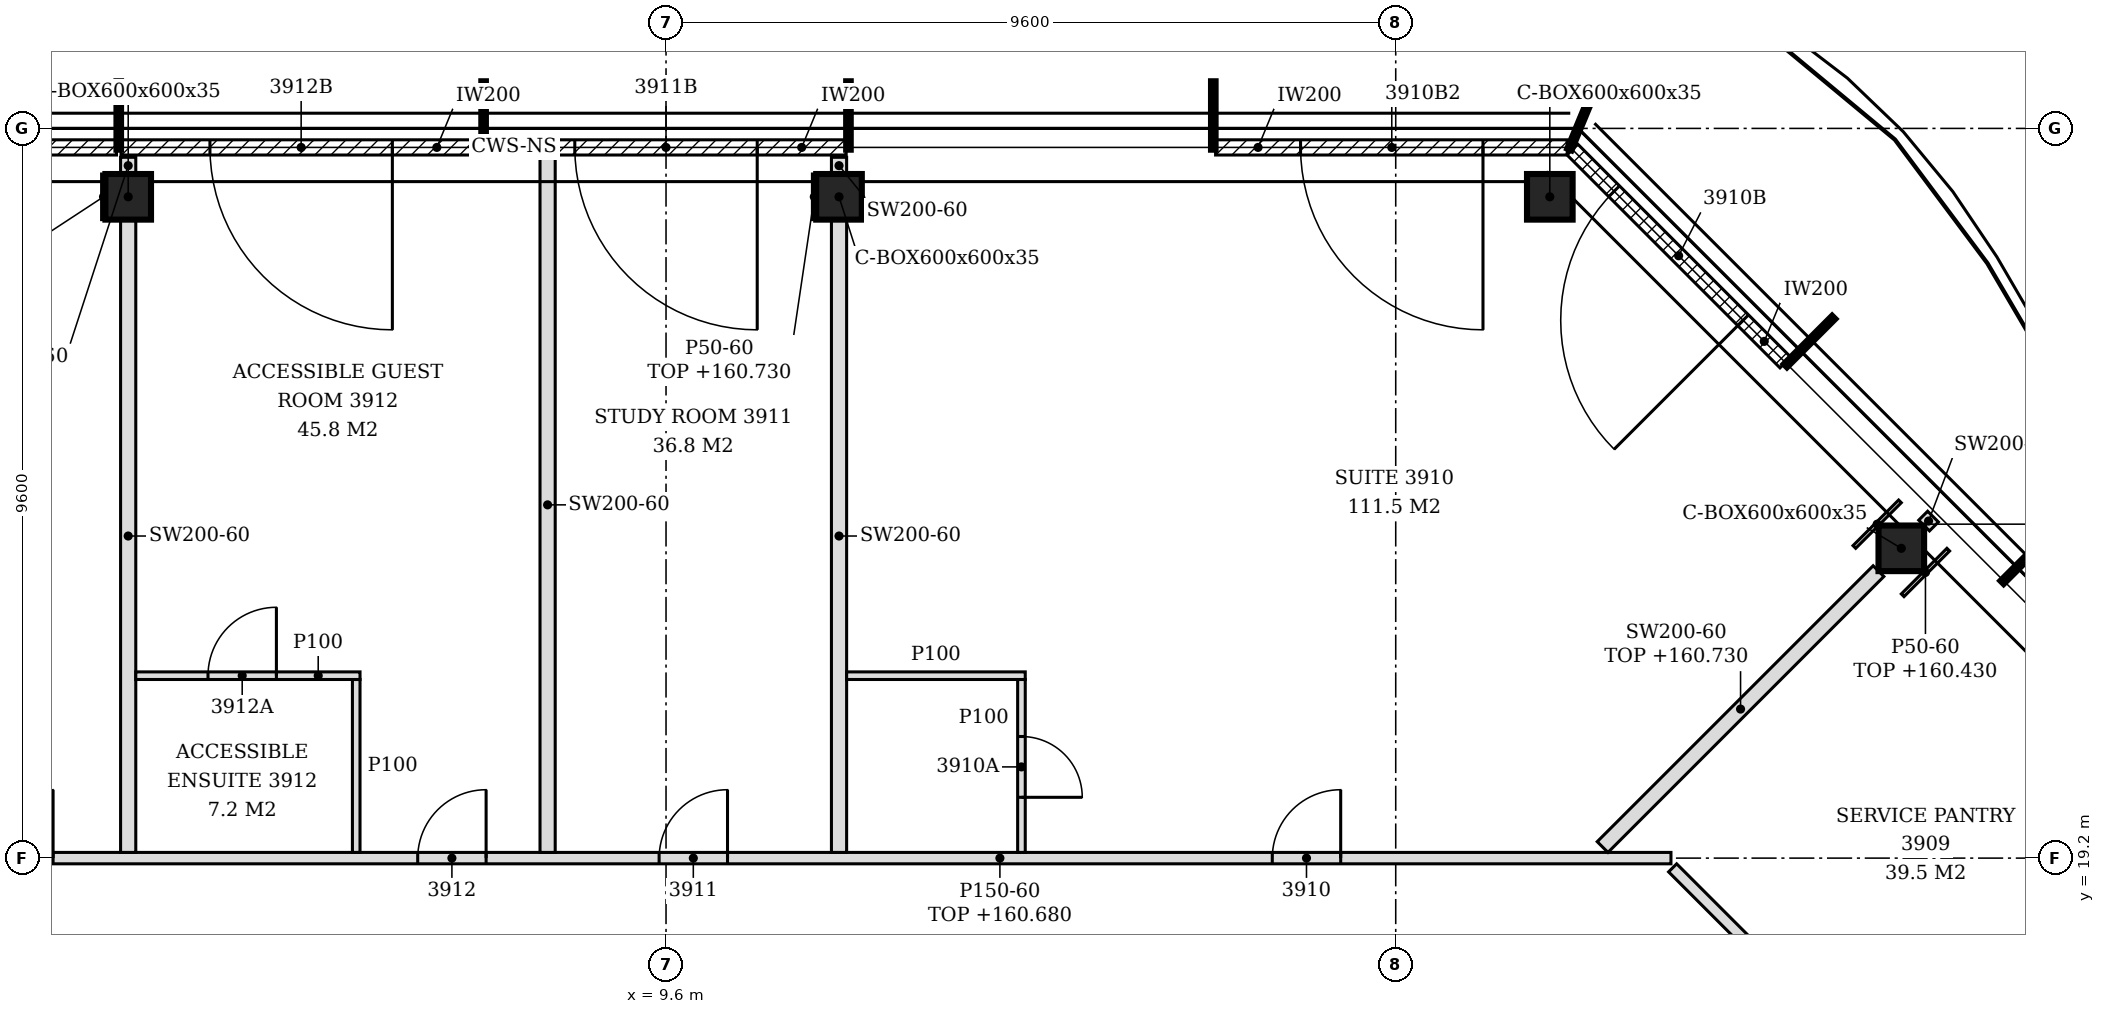
"""IFC4 building model, lengths in metres.
Left out: names, types, materials, properties, quantities, classifications, styles, units other than length and angle.
Written with IfcOpenShell. Run it as: python <this file> out.ifc"""

import sys

from ifc_helpers import new_model, si_unit, direction, frame, frame_2d, origin, origin_2d, place, context, subcontext, project, spatial, polyline, rectangle, hollow_rectangle, outline, extrude, element, fill, save


model = new_model("IFC4")
c1 = context("Model", 3, precision=1e-05, world=origin(), true_north=direction((0.0, 1.0)))
c2 = subcontext(c1, "Body", "Model", "MODEL_VIEW")
j1 = project(units=[si_unit("LENGTHUNIT", "METRE"), si_unit("PLANEANGLEUNIT", "RADIAN")], contexts=[c1])
p1 = place(None, origin())
s1 = spatial("IfcSite", under=j1, at=p1, CompositionType="ELEMENT")
p2 = place(p1, origin())
s2 = spatial("IfcBuilding", under=s1, at=p2, CompositionType="ELEMENT")
p3 = place(p2, frame((0.0, 0.0, 157.8)))
s3 = spatial("IfcBuildingStorey", under=s2, at=p3, CompositionType="ELEMENT", Elevation=157.8)
for number, where, z_axis, x_axis in (
    (1, (25.852, 23.276, -0.15), (0.0, 0.0, 1.0), (1.0, 0.0, 0.0)),
    (2, (21.227, 27.9, -0.15), (0.0, 0.0, 1.0), (1.0, 0.0, 0.0)),
    (3, (11.876, 27.9, -0.15), (0.0, 0.0, 1.0), (1.0, 0.0, 0.0)),
    (4, (2.524, 27.9, -0.15), (0.0, 0.0, 1.0), (1.0, 0.0, 0.0)),
):
    element("IfcColumn", number, at=place(p3, frame(where, z_axis=z_axis, x_axis=x_axis)), inside=s3, PredefinedType="COLUMN", context=c2, shape_type="SweptSolid", body=[
        extrude(hollow_rectangle(XDim=0.6, YDim=0.6, WallThickness=0.035, at=origin_2d()), origin(), (0.0, 0.0, 1.0), 3.6),
    ])
p4 = place(p3, frame((24.326, 25.72, 0.0), z_axis=(0.0, 0.0, 1.0), x_axis=(-0.707106781187, 0.707106781187, 0.0)))
e5 = element("IfcWall", 5, at=p4, inside=s3, PredefinedType="NOTDEFINED", context=c2, shape_type="SweptSolid", body=[
    extrude(rectangle(XDim=3.962, YDim=0.2, at=frame_2d((1.981, 0.0))), origin(), (0.0, 0.0, 1.0), 3.45),
])
p5 = place(p4, frame((0.786, 0.0, 0.0)))
e6 = element("IfcOpeningElement", 6, at=p5, cuts=e5, PredefinedType="OPENING", context=c2, shape_type="SweptSolid", body=[
    extrude(rectangle(XDim=2.4, YDim=2.4, at=frame_2d((1.2, 1.2))), frame((0.0, 0.11, 0.0), z_axis=(0.0, -1.0, 0.0), x_axis=(1.0, 0.0, 0.0)), (0.0, 0.0, 1.0), 0.22),
])
p6 = place(p3, frame((21.457, 28.55, 0.0), z_axis=(0.0, 0.0, 1.0), x_axis=(-1.0, 0.0, 0.0)))
e7 = element("IfcWall", 7, at=p6, inside=s3, PredefinedType="NOTDEFINED", context=c2, shape_type="SweptSolid", body=[
    extrude(rectangle(XDim=4.626, YDim=0.2, at=frame_2d((2.313, 0.0))), origin(), (0.0, 0.0, 1.0), 3.45),
])
p7 = place(p6, frame((1.108, 0.0, 0.0)))
e8 = element("IfcOpeningElement", 8, at=p7, cuts=e7, PredefinedType="OPENING", context=c2, shape_type="SweptSolid", body=[
    extrude(rectangle(XDim=2.4, YDim=2.4, at=frame_2d((1.2, 1.2))), frame((0.0, 0.11, 0.0), z_axis=(0.0, -1.0, 0.0), x_axis=(1.0, 0.0, 0.0)), (0.0, 0.0, 1.0), 0.22),
])
p8 = place(p3, frame((11.97, 28.55, 0.0), z_axis=(0.0, 0.0, 1.0), x_axis=(-1.0, 0.0, 0.0)))
e9 = element("IfcWall", 9, at=p8, inside=s3, PredefinedType="NOTDEFINED", context=c2, shape_type="SweptSolid", body=[
    extrude(rectangle(XDim=4.74, YDim=0.2, at=frame_2d((2.37, 0.0))), origin(), (0.0, 0.0, 1.0), 3.45),
])
p9 = place(p8, frame((1.17, 0.0, 0.0)))
e10 = element("IfcOpeningElement", 10, at=p9, cuts=e9, PredefinedType="OPENING", context=c2, shape_type="SweptSolid", body=[
    extrude(rectangle(XDim=2.4, YDim=2.4, at=frame_2d((1.2, 1.2))), frame((0.0, 0.11, 0.0), z_axis=(0.0, -1.0, 0.0), x_axis=(1.0, 0.0, 0.0)), (0.0, 0.0, 1.0), 0.22),
])
p10 = place(p3, frame((7.17, 28.55, 0.0), z_axis=(0.0, 0.0, 1.0), x_axis=(-1.0, 0.0, 0.0)))
e11 = element("IfcWall", 11, at=p10, inside=s3, PredefinedType="NOTDEFINED", context=c2, shape_type="SweptSolid", body=[
    extrude(rectangle(XDim=4.74, YDim=0.2, at=frame_2d((2.37, 0.0))), origin(), (0.0, 0.0, 1.0), 3.45),
])
p11 = place(p10, frame((1.17, 0.0, 0.0)))
e12 = element("IfcOpeningElement", 12, at=p11, cuts=e11, PredefinedType="OPENING", context=c2, shape_type="SweptSolid", body=[
    extrude(rectangle(XDim=2.4, YDim=2.4, at=frame_2d((1.2, 1.2))), frame((0.0, 0.11, 0.0), z_axis=(0.0, -1.0, 0.0), x_axis=(1.0, 0.0, 0.0)), (0.0, 0.0, 1.0), 0.22),
])
p12 = place(p3, frame((2.37, 28.55, 0.0), z_axis=(0.0, 0.0, 1.0), x_axis=(-1.0, 0.0, 0.0)))
e13 = element("IfcWall", 13, at=p12, inside=s3, PredefinedType="NOTDEFINED", context=c2, shape_type="SweptSolid", body=[
    extrude(rectangle(XDim=4.74, YDim=0.2, at=frame_2d((2.37, 0.0))), origin(), (0.0, 0.0, 1.0), 3.45),
])
p13 = place(p12, frame((1.17, 0.0, 0.0)))
e14 = element("IfcOpeningElement", 14, at=p13, cuts=e13, PredefinedType="OPENING", context=c2, shape_type="SweptSolid", body=[
    extrude(rectangle(XDim=2.4, YDim=2.4, at=frame_2d((1.2, 1.2))), frame((0.0, 0.11, 0.0), z_axis=(0.0, -1.0, 0.0), x_axis=(1.0, 0.0, 0.0)), (0.0, 0.0, 1.0), 0.22),
])
p14 = place(p3, frame((26.869, 15.045, 0.0), z_axis=(0.0, 0.0, 1.0), x_axis=(-0.706999586952, 0.707213959174, 0.0)))
e15 = element("IfcWall", 15, at=p14, inside=s3, PredefinedType="PARTITIONING", context=c2, shape_type="SweptSolid", body=[
    extrude(rectangle(XDim=5.694, YDim=0.15, at=frame_2d((2.847, 0.0))), origin(), (0.0, 0.0, 1.0), 2.93),
])
p15 = place(p14, frame((2.487, 0.0, 0.0)))
e16 = element("IfcOpeningElement", 16, at=p15, cuts=e15, PredefinedType="OPENING", context=c2, shape_type="SweptSolid", body=[
    extrude(rectangle(XDim=0.9, YDim=2.1, at=frame_2d((0.45, 1.05))), frame((0.0, 0.085, 0.0), z_axis=(0.0, -1.0, 0.0), x_axis=(1.0, 0.0, 0.0)), (0.0, 0.0, 1.0), 0.17),
])
p16 = place(p3, frame((-8.421, 19.2, 0.0), z_axis=(0.0, 0.0, 1.0), x_axis=(1.0, 0.0, 0.0)))
e17 = element("IfcWall", 17, at=p16, inside=s3, PredefinedType="PARTITIONING", context=c2, shape_type="SweptSolid", body=[
    extrude(outline(polyline([(0.0, 0.0), (31.242, 0.0), (31.242, 2.88), (27.771, 2.88), (27.769, 2.73), (27.471, 2.73), (27.469, 2.88), (15.771, 2.88), (15.769, 2.73), (15.471, 2.73), (15.469, 2.88), (3.771, 2.88), (3.769, 2.73), (3.471, 2.73), (3.469, 2.88), (0.0, 2.88), (0.0, 0.0)])), frame((0.0, 0.075, 0.0), z_axis=(0.0, -1.0, 0.0), x_axis=(1.0, 0.0, 0.0)), (0.0, 0.0, 1.0), 0.15),
])
p17 = place(p16, frame((25.997, 0.0, 0.0)))
e18 = element("IfcOpeningElement", 18, at=p17, cuts=e17, PredefinedType="OPENING", context=c2, shape_type="SweptSolid", body=[
    extrude(rectangle(XDim=0.9, YDim=2.1, at=frame_2d((0.45, 1.05))), frame((0.0, 0.085, 0.0), z_axis=(0.0, -1.0, 0.0), x_axis=(1.0, 0.0, 0.0)), (0.0, 0.0, 1.0), 0.17),
])
p18 = place(p16, frame((17.93, 0.0, 0.0)))
e19 = element("IfcOpeningElement", 19, at=p18, cuts=e17, PredefinedType="OPENING", context=c2, shape_type="SweptSolid", body=[
    extrude(rectangle(XDim=0.9, YDim=2.1, at=frame_2d((0.45, 1.05))), frame((0.0, 0.085, 0.0), z_axis=(0.0, -1.0, 0.0), x_axis=(1.0, 0.0, 0.0)), (0.0, 0.0, 1.0), 0.17),
])
p19 = place(p16, frame((14.754, 0.0, 0.0)))
e20 = element("IfcOpeningElement", 20, at=p19, cuts=e17, PredefinedType="OPENING", context=c2, shape_type="SweptSolid", body=[
    extrude(rectangle(XDim=0.9, YDim=2.1, at=frame_2d((0.45, 1.05))), frame((0.0, 0.085, 0.0), z_axis=(0.0, -1.0, 0.0), x_axis=(1.0, 0.0, 0.0)), (0.0, 0.0, 1.0), 0.17),
])
p20 = place(p16, frame((9.057, 0.0, 0.0)))
e21 = element("IfcOpeningElement", 21, at=p20, cuts=e17, PredefinedType="OPENING", context=c2, shape_type="SweptSolid", body=[
    extrude(rectangle(XDim=0.9, YDim=2.1, at=frame_2d((0.45, 1.05))), frame((0.0, 0.085, 0.0), z_axis=(0.0, -1.0, 0.0), x_axis=(1.0, 0.0, 0.0)), (0.0, 0.0, 1.0), 0.17),
])
p21 = place(p16, frame((2.907, 0.0, 0.0)))
e22 = element("IfcOpeningElement", 22, at=p21, cuts=e17, PredefinedType="OPENING", context=c2, shape_type="SweptSolid", body=[
    extrude(rectangle(XDim=0.9, YDim=2.1, at=frame_2d((0.45, 1.05))), frame((0.0, 0.085, 0.0), z_axis=(0.0, -1.0, 0.0), x_axis=(1.0, 0.0, 0.0)), (0.0, 0.0, 1.0), 0.17),
])
p22 = place(p3, frame((2.524, 19.275, 0.0), z_axis=(0.0, 0.0, 1.0), x_axis=(0.0, 1.0, 0.0)))
e23 = element("IfcWall", 23, at=p22, inside=s3, PredefinedType="PARTITIONING", context=c2, shape_type="SweptSolid", body=[
    extrude(outline(polyline([(0.0, 0.0), (8.325, 0.0), (8.325, 3.45), (4.83, 3.45), (4.828, 2.88), (4.62, 2.88), (4.618, 3.45), (0.03, 3.45), (0.028, 2.88), (0.0, 2.88), (0.0, 0.0)])), frame((0.0, 0.1, 0.0), z_axis=(0.0, -1.0, 0.0), x_axis=(1.0, 0.0, 0.0)), (0.0, 0.0, 1.0), 0.2),
])
p23 = place(p3, frame((5.524, 19.275, 0.0), z_axis=(0.0, 0.0, 1.0), x_axis=(0.0, 1.0, 0.0)))
e24 = element("IfcWall", 24, at=p23, inside=s3, PredefinedType="PARTITIONING", context=c2, shape_type="SweptSolid", body=[
    extrude(outline(polyline([(0.0, 0.0), (2.275, 0.0), (2.275, 3.45), (0.03, 3.45), (0.028, 2.88), (0.0, 2.88), (0.0, 0.0)])), frame((0.0, 0.05, 0.0), z_axis=(0.0, -1.0, 0.0), x_axis=(1.0, 0.0, 0.0)), (0.0, 0.0, 1.0), 0.1),
])
p24 = place(p3, frame((8.042, 19.275, 0.0), z_axis=(0.0, 0.0, 1.0), x_axis=(0.0, 1.0, 0.0)))
e25 = element("IfcWall", 25, at=p24, inside=s3, PredefinedType="PARTITIONING", context=c2, shape_type="SweptSolid", body=[
    extrude(outline(polyline([(0.0, 0.0), (9.145, 0.0), (9.145, 3.45), (8.775, 3.45), (8.773, 2.93), (8.475, 2.93), (8.473, 3.45), (4.83, 3.45), (4.828, 2.88), (4.62, 2.88), (4.618, 3.45), (0.03, 3.45), (0.028, 2.88), (0.0, 2.88), (0.0, 0.0)])), frame((0.0, 0.1, 0.0), z_axis=(0.0, -1.0, 0.0), x_axis=(1.0, 0.0, 0.0)), (0.0, 0.0, 1.0), 0.2),
])
p25 = place(p3, frame((11.876, 19.275, 0.0), z_axis=(0.0, 0.0, 1.0), x_axis=(0.0, 1.0, 0.0)))
e26 = element("IfcWall", 26, at=p25, inside=s3, PredefinedType="PARTITIONING", context=c2, shape_type="SweptSolid", body=[
    extrude(outline(polyline([(0.0, 0.0), (8.325, 0.0), (8.325, 3.45), (4.83, 3.45), (4.828, 2.88), (4.62, 2.88), (4.618, 3.45), (0.03, 3.45), (0.028, 2.88), (0.0, 2.88), (0.0, 0.0)])), frame((0.0, 0.1, 0.0), z_axis=(0.0, -1.0, 0.0), x_axis=(1.0, 0.0, 0.0)), (0.0, 0.0, 1.0), 0.2),
])
p26 = place(p3, frame((14.276, 19.275, 0.0), z_axis=(0.0, 0.0, 1.0), x_axis=(0.0, 1.0, 0.0)))
e27 = element("IfcWall", 27, at=p26, inside=s3, PredefinedType="PARTITIONING", context=c2, shape_type="SweptSolid", body=[
    extrude(outline(polyline([(0.0, 0.0), (2.275, 0.0), (2.275, 3.45), (0.03, 3.45), (0.028, 2.88), (0.0, 2.88), (0.0, 0.0)])), frame((0.0, 0.05, 0.0), z_axis=(0.0, -1.0, 0.0), x_axis=(1.0, 0.0, 0.0)), (0.0, 0.0, 1.0), 0.1),
])
p27 = place(p26, frame((0.725, 0.0, 0.0)))
e28 = element("IfcOpeningElement", 28, at=p27, cuts=e27, PredefinedType="OPENING", context=c2, shape_type="SweptSolid", body=[
    extrude(rectangle(XDim=0.8, YDim=2.1, at=frame_2d((0.4, 1.05))), frame((0.0, 0.06, 0.0), z_axis=(0.0, -1.0, 0.0), x_axis=(1.0, 0.0, 0.0)), (0.0, 0.0, 1.0), 0.12),
])
p28 = place(p3, frame((21.922, 19.346, 0.0), z_axis=(0.0, 0.0, 1.0), x_axis=(0.707106781187, 0.707106781187, 0.0)))
e29 = element("IfcWall", 29, at=p28, inside=s3, PredefinedType="PARTITIONING", context=c2, shape_type="SweptSolid", body=[
    extrude(rectangle(XDim=5.134, YDim=0.2, at=frame_2d((2.567, 0.0))), origin(), (0.0, 0.0, 1.0), 2.93),
])
p29 = place(p3, frame((2.624, 21.6, 0.0), z_axis=(0.0, 0.0, 1.0), x_axis=(1.0, 0.0, 0.0)))
e30 = element("IfcWall", 30, at=p29, inside=s3, PredefinedType="PARTITIONING", context=c2, shape_type="SweptSolid", body=[
    extrude(rectangle(XDim=2.95, YDim=0.1, at=frame_2d((1.475, 0.0))), origin(), (0.0, 0.0, 1.0), 3.45),
])
p30 = place(p29, frame((0.95, 0.0, 0.0)))
e31 = element("IfcOpeningElement", 31, at=p30, cuts=e30, PredefinedType="OPENING", context=c2, shape_type="SweptSolid", body=[
    extrude(rectangle(XDim=0.9, YDim=2.1, at=frame_2d((0.45, 1.05))), frame((0.0, 0.06, 0.0), z_axis=(0.0, -1.0, 0.0), x_axis=(1.0, 0.0, 0.0)), (0.0, 0.0, 1.0), 0.12),
])
p31 = place(p3, frame((11.976, 21.6, 0.0), z_axis=(0.0, 0.0, 1.0), x_axis=(1.0, 0.0, 0.0)))
e32 = element("IfcWall", 32, at=p31, inside=s3, PredefinedType="PARTITIONING", context=c2, shape_type="SweptSolid", body=[
    extrude(rectangle(XDim=2.35, YDim=0.1, at=frame_2d((1.175, 0.0))), origin(), (0.0, 0.0, 1.0), 3.45),
])
p32 = place(p3, frame((26.152, 23.576, 0.0), z_axis=(0.0, 0.0, 1.0), x_axis=(0.707106781187, 0.707106781187, 0.0)))
e33 = element("IfcWall", 33, at=p32, inside=s3, PredefinedType="PARTITIONING", context=c2, shape_type="SweptSolid", body=[
    extrude(rectangle(XDim=0.166, YDim=0.2, at=frame_2d((0.083, 0.0))), origin(), (0.0, 0.0, 1.0), 3.45),
])
for number, where, z_axis, x_axis in (
    (34, (2.524, 28.2, 0.0), (0.0, 0.0, 1.0), (0.0, 1.0, 0.0)),
    (35, (11.876, 28.2, 0.0), (0.0, 0.0, 1.0), (0.0, 1.0, 0.0)),
):
    element("IfcWall", number, at=place(p3, frame(where, z_axis=z_axis, x_axis=x_axis)), inside=s3, PredefinedType="PARTITIONING", context=c2, shape_type="SweptSolid", body=[
        extrude(rectangle(XDim=0.22, YDim=0.2, at=frame_2d((0.11, 0.0))), origin(), (0.0, 0.0, 1.0), 3.45),
    ])
for number, where, z_axis, x_axis in (
    (36, (2.199, 27.6, 0.0), (0.0, 0.0, 1.0), (0.0, 1.0, 0.0)),
    (37, (11.551, 27.6, 0.0), (0.0, 0.0, 1.0), (0.0, 1.0, 0.0)),
):
    element("IfcWall", number, at=place(p3, frame(where, z_axis=z_axis, x_axis=x_axis)), inside=s3, PredefinedType="PARTITIONING", context=c2, shape_type="SweptSolid", body=[
        extrude(rectangle(XDim=0.6, YDim=0.05, at=frame_2d((0.3, 0.0))), origin(), (0.0, 0.0, 1.0), 2.93),
    ])
p33 = place(p3, frame((25.234, 23.293, 0.0), z_axis=(0.0, 0.0, 1.0), x_axis=(0.707106781187, 0.707106781187, 0.0)))
e38 = element("IfcWall", 38, at=p33, inside=s3, PredefinedType="PARTITIONING", context=c2, shape_type="SweptSolid", body=[
    extrude(rectangle(XDim=0.848, YDim=0.05, at=frame_2d((0.424, 0.0))), origin(), (0.0, 0.0, 1.0), 2.93),
])
p34 = place(p3, frame((25.869, 22.658, 0.0), z_axis=(0.0, 0.0, 1.0), x_axis=(0.707106781187, 0.707106781187, 0.0)))
e39 = element("IfcWall", 39, at=p34, inside=s3, PredefinedType="PARTITIONING", context=c2, shape_type="SweptSolid", body=[
    extrude(rectangle(XDim=0.849, YDim=0.05, at=frame_2d((0.424, 0.0))), origin(), (0.0, 0.0, 1.0), 2.63),
])
p35 = place(p5, origin())
e40 = element("IfcDoor", 40, at=p35, inside=s3, OperationType="SINGLE_SWING_LEFT", PredefinedType="DOOR", context=c2, shape_type="SweptSolid", body=[
    extrude(rectangle(XDim=2.4, YDim=2.4, at=frame_2d((1.2, 1.2))), frame((0.0, 0.025, 0.0), z_axis=(0.0, -1.0, 0.0), x_axis=(1.0, 0.0, 0.0)), (0.0, 0.0, 1.0), 0.05),
])
fill(e6, e40)
p36 = place(p7, origin())
e41 = element("IfcDoor", 41, at=p36, inside=s3, OperationType="SINGLE_SWING_LEFT", PredefinedType="DOOR", context=c2, shape_type="SweptSolid", body=[
    extrude(rectangle(XDim=2.4, YDim=2.4, at=frame_2d((1.2, 1.2))), frame((0.0, 0.025, 0.0), z_axis=(0.0, -1.0, 0.0), x_axis=(1.0, 0.0, 0.0)), (0.0, 0.0, 1.0), 0.05),
])
fill(e8, e41)
p37 = place(p9, origin())
e42 = element("IfcDoor", 42, at=p37, inside=s3, OperationType="SINGLE_SWING_LEFT", PredefinedType="DOOR", context=c2, shape_type="SweptSolid", body=[
    extrude(rectangle(XDim=2.4, YDim=2.4, at=frame_2d((1.2, 1.2))), frame((0.0, 0.025, 0.0), z_axis=(0.0, -1.0, 0.0), x_axis=(1.0, 0.0, 0.0)), (0.0, 0.0, 1.0), 0.05),
])
fill(e10, e42)
p38 = place(p11, origin())
e43 = element("IfcDoor", 43, at=p38, inside=s3, OperationType="SINGLE_SWING_LEFT", PredefinedType="DOOR", context=c2, shape_type="SweptSolid", body=[
    extrude(rectangle(XDim=2.4, YDim=2.4, at=frame_2d((1.2, 1.2))), frame((0.0, 0.025, 0.0), z_axis=(0.0, -1.0, 0.0), x_axis=(1.0, 0.0, 0.0)), (0.0, 0.0, 1.0), 0.05),
])
fill(e12, e43)
p39 = place(p17, origin())
e44 = element("IfcDoor", 44, at=p39, inside=s3, OperationType="SINGLE_SWING_RIGHT", PredefinedType="DOOR", context=c2, shape_type="SweptSolid", body=[
    extrude(rectangle(XDim=0.9, YDim=2.1, at=frame_2d((0.45, 1.05))), frame((0.0, 0.025, 0.0), z_axis=(0.0, -1.0, 0.0), x_axis=(1.0, 0.0, 0.0)), (0.0, 0.0, 1.0), 0.05),
])
fill(e18, e44)
p40 = place(p27, frame((0.8, 0.0, 0.0), z_axis=(0.0, 0.0, 1.0), x_axis=(-1.0, 0.0, 0.0)))
e45 = element("IfcDoor", 45, at=p40, inside=s3, OperationType="SINGLE_SWING_RIGHT", PredefinedType="DOOR", context=c2, shape_type="SweptSolid", body=[
    extrude(rectangle(XDim=0.8, YDim=2.1, at=frame_2d((0.4, 1.05))), frame((0.0, 0.025, 0.0), z_axis=(0.0, -1.0, 0.0), x_axis=(1.0, 0.0, 0.0)), (0.0, 0.0, 1.0), 0.05),
])
fill(e28, e45)
p41 = place(p18, origin())
e46 = element("IfcDoor", 46, at=p41, inside=s3, OperationType="SINGLE_SWING_RIGHT", PredefinedType="DOOR", context=c2, shape_type="SweptSolid", body=[
    extrude(rectangle(XDim=0.9, YDim=2.1, at=frame_2d((0.45, 1.05))), frame((0.0, 0.025, 0.0), z_axis=(0.0, -1.0, 0.0), x_axis=(1.0, 0.0, 0.0)), (0.0, 0.0, 1.0), 0.05),
])
fill(e19, e46)
p42 = place(p19, origin())
e47 = element("IfcDoor", 47, at=p42, inside=s3, OperationType="SINGLE_SWING_RIGHT", PredefinedType="DOOR", context=c2, shape_type="SweptSolid", body=[
    extrude(rectangle(XDim=0.9, YDim=2.1, at=frame_2d((0.45, 1.05))), frame((0.0, 0.025, 0.0), z_axis=(0.0, -1.0, 0.0), x_axis=(1.0, 0.0, 0.0)), (0.0, 0.0, 1.0), 0.05),
])
fill(e20, e47)
p43 = place(p30, origin())
e48 = element("IfcDoor", 48, at=p43, inside=s3, OperationType="SINGLE_SWING_RIGHT", PredefinedType="DOOR", context=c2, shape_type="SweptSolid", body=[
    extrude(rectangle(XDim=0.9, YDim=2.1, at=frame_2d((0.45, 1.05))), frame((0.0, 0.025, 0.0), z_axis=(0.0, -1.0, 0.0), x_axis=(1.0, 0.0, 0.0)), (0.0, 0.0, 1.0), 0.05),
])
fill(e31, e48)
p44 = place(p20, origin())
e49 = element("IfcDoor", 49, at=p44, inside=s3, OperationType="SINGLE_SWING_RIGHT", PredefinedType="DOOR", context=c2, shape_type="SweptSolid", body=[
    extrude(rectangle(XDim=0.9, YDim=2.1, at=frame_2d((0.45, 1.05))), frame((0.0, 0.025, 0.0), z_axis=(0.0, -1.0, 0.0), x_axis=(1.0, 0.0, 0.0)), (0.0, 0.0, 1.0), 0.05),
])
fill(e21, e49)
save(model, sys.argv[1])
